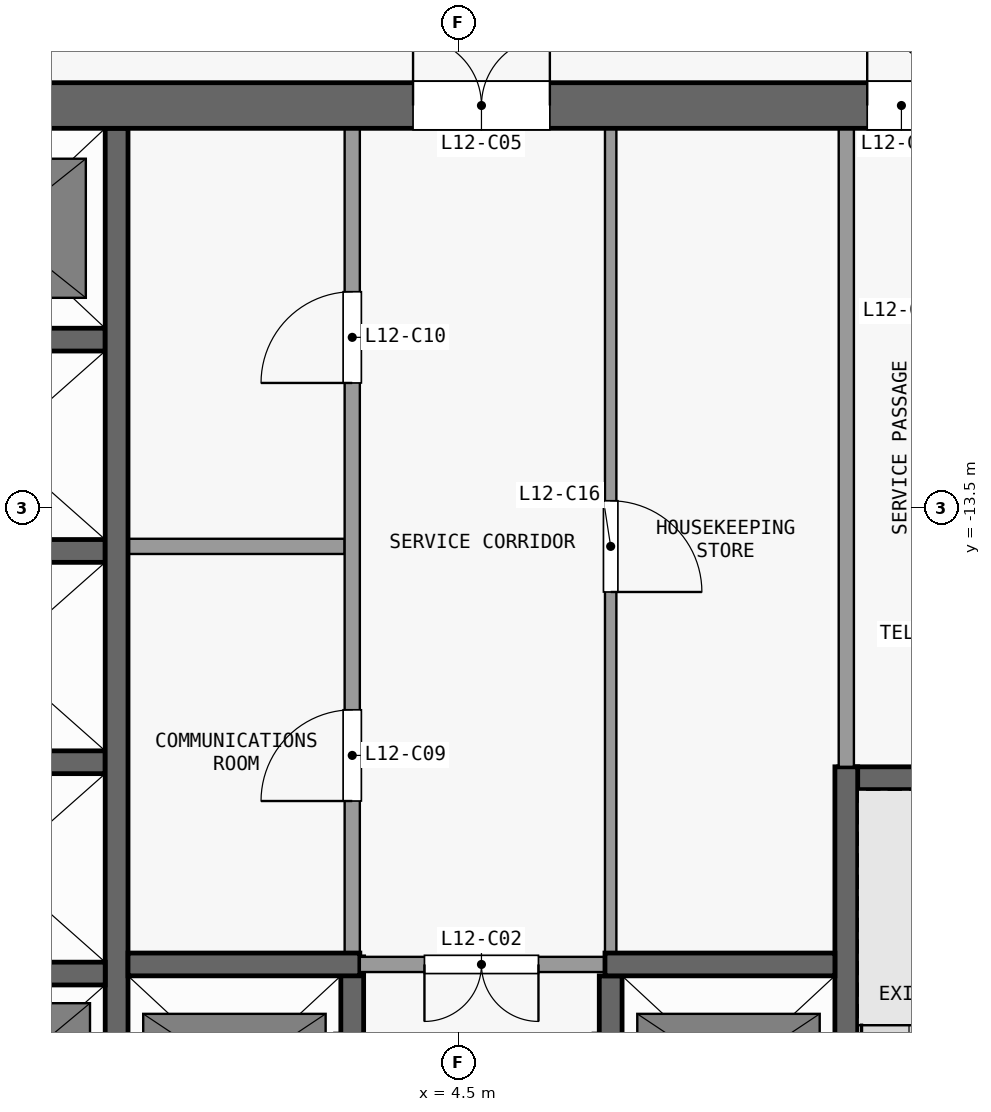
"""IFC4 building model, lengths in metres.
Left out: names, types, materials, properties, quantities, classifications, styles, units other than length and angle.
Written with IfcOpenShell. Run it as: python <this file> out.ifc"""

import sys

from ifc_helpers import new_model, si_unit, direction, frame, frame_2d, origin, place, context, subcontext, project, spatial, rectangle, extrude, element, fill, save


model = new_model("IFC4")
c1 = context("Model", 3, precision=1e-05, world=origin(), true_north=direction((0.0, 1.0)))
c2 = subcontext(c1, "Body", "Model", "MODEL_VIEW")
j1 = project(units=[si_unit("LENGTHUNIT", "METRE"), si_unit("PLANEANGLEUNIT", "RADIAN")], contexts=[c1])
p1 = place(None, origin())
s1 = spatial("IfcSite", under=j1, at=p1, CompositionType="ELEMENT")
p2 = place(p1, origin())
s2 = spatial("IfcBuilding", under=s1, at=p2, CompositionType="ELEMENT")
p3 = place(p2, frame((0.0, 0.0, 54.1)))
s3 = spatial("IfcBuildingStorey", under=s2, at=p3, CompositionType="ELEMENT", Elevation=54.1)
p4 = place(p3, frame((-13.5, -8.2, 0.0), z_axis=(0.0, 0.0, 1.0), x_axis=(1.0, 0.0, 0.0)))
e1 = element("IfcWall", 1, at=p4, inside=s3, PredefinedType="SHEAR", context=c2, shape_type="SweptSolid", body=[
    extrude(rectangle(XDim=27.0, YDim=0.6, at=frame_2d((13.5, 0.0))), origin(), (0.0, 0.0, 1.0), 3.3),
])
p5 = place(p4, frame((7.8, 0.0, 0.0)))
e2 = element("IfcOpeningElement", 2, at=p5, cuts=e1, PredefinedType="OPENING", context=c2, shape_type="SweptSolid", body=[
    extrude(rectangle(XDim=1.8, YDim=2.1, at=frame_2d((0.9, 1.05))), frame((0.0, 0.31, 0.0), z_axis=(0.0, -1.0, 0.0), x_axis=(1.0, 0.0, 0.0)), (0.0, 0.0, 1.0), 0.62),
])
p6 = place(p4, frame((17.4, 0.0, 0.0)))
e3 = element("IfcOpeningElement", 3, at=p6, cuts=e1, PredefinedType="OPENING", context=c2, shape_type="SweptSolid", body=[
    extrude(rectangle(XDim=1.8, YDim=2.1, at=frame_2d((0.9, 1.05))), frame((0.0, 0.31, 0.0), z_axis=(0.0, -1.0, 0.0), x_axis=(1.0, 0.0, 0.0)), (0.0, 0.0, 1.0), 0.62),
])
p7 = place(p4, frame((2.725, 0.0, 0.0)))
e4 = element("IfcOpeningElement", 4, at=p7, cuts=e1, PredefinedType="OPENING", context=c2, shape_type="SweptSolid", body=[
    extrude(rectangle(XDim=0.9, YDim=2.1, at=frame_2d((0.45, 1.05))), frame((0.0, 0.31, 0.0), z_axis=(0.0, -1.0, 0.0), x_axis=(1.0, 0.0, 0.0)), (0.0, 0.0, 1.0), 0.62),
])
p8 = place(p4, frame((23.375, 0.0, 0.0)))
e5 = element("IfcOpeningElement", 5, at=p8, cuts=e1, PredefinedType="OPENING", context=c2, shape_type="SweptSolid", body=[
    extrude(rectangle(XDim=0.9, YDim=2.1, at=frame_2d((0.45, 1.05))), frame((0.0, 0.31, 0.0), z_axis=(0.0, -1.0, 0.0), x_axis=(1.0, 0.0, 0.0)), (0.0, 0.0, 1.0), 0.62),
])
p9 = place(p3, frame((-2.95, -19.62, 0.0), z_axis=(0.0, 0.0, 1.0), x_axis=(1.0, 0.0, 0.0)))
e6 = element("IfcWall", 6, at=p9, inside=s3, PredefinedType="SHEAR", context=c2, shape_type="SweptSolid", body=[
    extrude(rectangle(XDim=2.8, YDim=0.3, at=frame_2d((1.4, 0.0))), origin(), (0.0, 0.0, 1.0), 3.3),
])
p10 = place(p3, frame((0.15, -19.5, 0.0), z_axis=(0.0, 0.0, 1.0), x_axis=(1.0, 0.0, 0.0)))
e7 = element("IfcWall", 7, at=p10, inside=s3, PredefinedType="SHEAR", context=c2, shape_type="SweptSolid", body=[
    extrude(rectangle(XDim=3.05, YDim=0.3, at=frame_2d((1.525, 0.0))), origin(), (0.0, 0.0, 1.0), 3.3),
])
p11 = place(p3, frame((6.575, -19.5, 0.0), z_axis=(0.0, 0.0, 1.0), x_axis=(-1.0, 0.0, 0.0)))
e8 = element("IfcWall", 8, at=p11, inside=s3, PredefinedType="PARTITIONING", context=c2, shape_type="SweptSolid", body=[
    extrude(rectangle(XDim=3.375, YDim=0.2, at=frame_2d((1.688, 0.0))), origin(), (0.0, 0.0, 1.0), 3.3),
])
p12 = place(p11, frame((1.025, 0.0, 0.0)))
e9 = element("IfcOpeningElement", 9, at=p12, cuts=e8, PredefinedType="OPENING", context=c2, shape_type="SweptSolid", body=[
    extrude(rectangle(XDim=1.5, YDim=2.1, at=frame_2d((0.75, 1.05))), frame((0.0, 0.11, 0.0), z_axis=(0.0, -1.0, 0.0), x_axis=(1.0, 0.0, 0.0)), (0.0, 0.0, 1.0), 0.22),
])
p13 = place(p3, frame((6.425, -19.5, 0.0), z_axis=(0.0, 0.0, 1.0), x_axis=(1.0, 0.0, 0.0)))
e10 = element("IfcWall", 10, at=p13, inside=s3, PredefinedType="SHEAR", context=c2, shape_type="SweptSolid", body=[
    extrude(rectangle(XDim=3.025, YDim=0.3, at=frame_2d((1.512, 0.0))), origin(), (0.0, 0.0, 1.0), 3.3),
])
p14 = place(p3, frame((9.5, -17.05, 0.0), z_axis=(0.0, 0.0, 1.0), x_axis=(1.0, 0.0, 0.0)))
e11 = element("IfcWall", 11, at=p14, inside=s3, PredefinedType="SHEAR", context=c2, shape_type="SweptSolid", body=[
    extrude(rectangle(XDim=3.1, YDim=0.3, at=frame_2d((1.55, 0.0))), origin(), (0.0, 0.0, 1.0), 3.3),
])
for number, where, z_axis, x_axis in (
    (12, (-2.95, -16.84, 0.0), (0.0, 0.0, 1.0), (1.0, 0.0, 0.0)),
    (13, (-2.95, -14.06, 0.0), (0.0, 0.0, 1.0), (1.0, 0.0, 0.0)),
):
    element("IfcWall", number, at=place(p3, frame(where, z_axis=z_axis, x_axis=x_axis)), inside=s3, PredefinedType="SHEAR", context=c2, shape_type="SweptSolid", body=[
        extrude(rectangle(XDim=2.8, YDim=0.3, at=frame_2d((1.4, 0.0))), origin(), (0.0, 0.0, 1.0), 3.3),
    ])
p15 = place(p3, frame((0.15, -14.0, 0.0), z_axis=(0.0, 0.0, 1.0), x_axis=(1.0, 0.0, 0.0)))
e14 = element("IfcWall", 14, at=p15, inside=s3, PredefinedType="PARTITIONING", context=c2, shape_type="SweptSolid", body=[
    extrude(rectangle(XDim=2.85, YDim=0.2, at=frame_2d((1.425, 0.0))), origin(), (0.0, 0.0, 1.0), 3.3),
])
p16 = place(p3, frame((-2.95, -11.28, 0.0), z_axis=(0.0, 0.0, 1.0), x_axis=(1.0, 0.0, 0.0)))
e15 = element("IfcWall", 15, at=p16, inside=s3, PredefinedType="SHEAR", context=c2, shape_type="SweptSolid", body=[
    extrude(rectangle(XDim=2.8, YDim=0.3, at=frame_2d((1.4, 0.0))), origin(), (0.0, 0.0, 1.0), 3.3),
])
p17 = place(p3, frame((0.0, -22.25, 0.0), z_axis=(0.0, 0.0, 1.0), x_axis=(0.0, 1.0, 0.0)))
e16 = element("IfcWall", 16, at=p17, inside=s3, PredefinedType="SHEAR", context=c2, shape_type="SweptSolid", body=[
    extrude(rectangle(XDim=13.75, YDim=0.3, at=frame_2d((6.875, 0.0))), origin(), (0.0, 0.0, 1.0), 3.3),
])
p18 = place(p3, frame((3.1, -22.25, 0.0), z_axis=(0.0, 0.0, 1.0), x_axis=(0.0, 1.0, 0.0)))
e17 = element("IfcWall", 17, at=p18, inside=s3, PredefinedType="SHEAR", context=c2, shape_type="SweptSolid", body=[
    extrude(rectangle(XDim=2.85, YDim=0.3, at=frame_2d((1.425, 0.0))), origin(), (0.0, 0.0, 1.0), 3.3),
])
p19 = place(p18, frame((0.75, 0.0, 0.0)))
e18 = element("IfcOpeningElement", 18, at=p19, cuts=e17, PredefinedType="OPENING", context=c2, shape_type="SweptSolid", body=[
    extrude(rectangle(XDim=1.1, YDim=2.1, at=frame_2d((0.55, 1.05))), frame((0.0, 0.16, 0.0), z_axis=(0.0, -1.0, 0.0), x_axis=(1.0, 0.0, 0.0)), (0.0, 0.0, 1.0), 0.32),
])
p20 = place(p3, frame((3.1, -19.6, 0.0), z_axis=(0.0, 0.0, 1.0), x_axis=(0.0, 1.0, 0.0)))
e19 = element("IfcWall", 19, at=p20, inside=s3, PredefinedType="PARTITIONING", context=c2, shape_type="SweptSolid", body=[
    extrude(rectangle(XDim=11.1, YDim=0.2, at=frame_2d((5.55, 0.0))), origin(), (0.0, 0.0, 1.0), 3.3),
])
p21 = place(p20, frame((2.25, 0.0, 0.0)))
e20 = element("IfcOpeningElement", 20, at=p21, cuts=e19, PredefinedType="OPENING", context=c2, shape_type="SweptSolid", body=[
    extrude(rectangle(XDim=1.2, YDim=2.1, at=frame_2d((0.6, 1.05))), frame((0.0, 0.11, 0.0), z_axis=(0.0, -1.0, 0.0), x_axis=(1.0, 0.0, 0.0)), (0.0, 0.0, 1.0), 0.22),
])
p22 = place(p20, frame((7.75, 0.0, 0.0)))
e21 = element("IfcOpeningElement", 21, at=p22, cuts=e19, PredefinedType="OPENING", context=c2, shape_type="SweptSolid", body=[
    extrude(rectangle(XDim=1.2, YDim=2.1, at=frame_2d((0.6, 1.05))), frame((0.0, 0.11, 0.0), z_axis=(0.0, -1.0, 0.0), x_axis=(1.0, 0.0, 0.0)), (0.0, 0.0, 1.0), 0.22),
])
p23 = place(p3, frame((6.5, -22.25, 0.0), z_axis=(0.0, 0.0, 1.0), x_axis=(0.0, 1.0, 0.0)))
e22 = element("IfcWall", 22, at=p23, inside=s3, PredefinedType="SHEAR", context=c2, shape_type="SweptSolid", body=[
    extrude(rectangle(XDim=2.6, YDim=0.3, at=frame_2d((1.3, 0.0))), origin(), (0.0, 0.0, 1.0), 3.3),
])
p24 = place(p23, frame((0.75, 0.0, 0.0)))
e23 = element("IfcOpeningElement", 23, at=p24, cuts=e22, PredefinedType="OPENING", context=c2, shape_type="SweptSolid", body=[
    extrude(rectangle(XDim=1.1, YDim=2.1, at=frame_2d((0.55, 1.05))), frame((0.0, 0.16, 0.0), z_axis=(0.0, -1.0, 0.0), x_axis=(1.0, 0.0, 0.0)), (0.0, 0.0, 1.0), 0.32),
])
p25 = place(p3, frame((6.5, -8.5, 0.0), z_axis=(0.0, 0.0, 1.0), x_axis=(0.0, -1.0, 0.0)))
e24 = element("IfcWall", 24, at=p25, inside=s3, PredefinedType="PARTITIONING", context=c2, shape_type="SweptSolid", body=[
    extrude(rectangle(XDim=10.85, YDim=0.15, at=frame_2d((5.425, 0.0))), origin(), (0.0, 0.0, 1.0), 3.3),
])
p26 = place(p25, frame((4.9, 0.0, 0.0)))
e25 = element("IfcOpeningElement", 25, at=p26, cuts=e24, PredefinedType="OPENING", context=c2, shape_type="SweptSolid", body=[
    extrude(rectangle(XDim=1.2, YDim=2.1, at=frame_2d((0.6, 1.05))), frame((0.0, 0.085, 0.0), z_axis=(0.0, -1.0, 0.0), x_axis=(1.0, 0.0, 0.0)), (0.0, 0.0, 1.0), 0.17),
])
p27 = place(p3, frame((9.6, -16.9, 0.0), z_axis=(0.0, 0.0, 1.0), x_axis=(0.0, -1.0, 0.0)))
e26 = element("IfcWall", 26, at=p27, inside=s3, PredefinedType="SHEAR", context=c2, shape_type="SweptSolid", body=[
    extrude(rectangle(XDim=7.7, YDim=0.3, at=frame_2d((3.85, 0.0))), origin(), (0.0, 0.0, 1.0), 3.3),
])
p28 = place(p27, frame((6.5, 0.0, 0.0)))
e27 = element("IfcOpeningElement", 27, at=p28, cuts=e26, PredefinedType="OPENING", context=c2, shape_type="SweptSolid", body=[
    extrude(rectangle(XDim=1.1, YDim=2.1, at=frame_2d((0.55, 1.05))), frame((0.0, 0.16, 0.0), z_axis=(0.0, -1.0, 0.0), x_axis=(1.0, 0.0, 0.0)), (0.0, 0.0, 1.0), 0.32),
])
p29 = place(p3, frame((9.6, -16.9, 0.0), z_axis=(0.0, 0.0, 1.0), x_axis=(0.0, 1.0, 0.0)))
e28 = element("IfcWall", 28, at=p29, inside=s3, PredefinedType="PARTITIONING", context=c2, shape_type="SweptSolid", body=[
    extrude(rectangle(XDim=8.4, YDim=0.2, at=frame_2d((4.2, 0.0))), origin(), (0.0, 0.0, 1.0), 3.3),
])
p30 = place(p12, origin())
e29 = element("IfcDoor", 29, at=p30, inside=s3, OperationType="DOUBLE_DOOR_SINGLE_SWING", PredefinedType="DOOR", context=c2, shape_type="SweptSolid", body=[
    extrude(rectangle(XDim=1.5, YDim=2.1, at=frame_2d((0.75, 1.05))), frame((0.0, 0.025, 0.0), z_axis=(0.0, -1.0, 0.0), x_axis=(1.0, 0.0, 0.0)), (0.0, 0.0, 1.0), 0.05),
])
fill(e9, e29)
p31 = place(p6, origin())
e30 = element("IfcDoor", 30, at=p31, inside=s3, OperationType="DOUBLE_DOOR_SINGLE_SWING", PredefinedType="DOOR", context=c2, shape_type="SweptSolid", body=[
    extrude(rectangle(XDim=1.8, YDim=2.1, at=frame_2d((0.9, 1.05))), frame((0.0, 0.025, 0.0), z_axis=(0.0, -1.0, 0.0), x_axis=(1.0, 0.0, 0.0)), (0.0, 0.0, 1.0), 0.05),
])
fill(e3, e30)
p32 = place(p21, origin())
e31 = element("IfcDoor", 31, at=p32, inside=s3, OperationType="SINGLE_SWING_LEFT", PredefinedType="DOOR", context=c2, shape_type="SweptSolid", body=[
    extrude(rectangle(XDim=1.2, YDim=2.1, at=frame_2d((0.6, 1.05))), frame((0.0, 0.025, 0.0), z_axis=(0.0, -1.0, 0.0), x_axis=(1.0, 0.0, 0.0)), (0.0, 0.0, 1.0), 0.05),
])
fill(e20, e31)
p33 = place(p22, origin())
e32 = element("IfcDoor", 32, at=p33, inside=s3, OperationType="SINGLE_SWING_LEFT", PredefinedType="DOOR", context=c2, shape_type="SweptSolid", body=[
    extrude(rectangle(XDim=1.2, YDim=2.1, at=frame_2d((0.6, 1.05))), frame((0.0, 0.025, 0.0), z_axis=(0.0, -1.0, 0.0), x_axis=(1.0, 0.0, 0.0)), (0.0, 0.0, 1.0), 0.05),
])
fill(e21, e32)
p34 = place(p8, origin())
e33 = element("IfcDoor", 33, at=p34, inside=s3, OperationType="SINGLE_SWING_LEFT", PredefinedType="DOOR", context=c2, shape_type="SweptSolid", body=[
    extrude(rectangle(XDim=0.9, YDim=2.1, at=frame_2d((0.45, 1.05))), frame((0.0, 0.025, 0.0), z_axis=(0.0, -1.0, 0.0), x_axis=(1.0, 0.0, 0.0)), (0.0, 0.0, 1.0), 0.05),
])
fill(e5, e33)
p35 = place(p26, origin())
e34 = element("IfcDoor", 34, at=p35, inside=s3, OperationType="SINGLE_SWING_RIGHT", PredefinedType="DOOR", context=c2, shape_type="SweptSolid", body=[
    extrude(rectangle(XDim=1.2, YDim=2.1, at=frame_2d((0.6, 1.05))), frame((0.0, 0.025, 0.0), z_axis=(0.0, -1.0, 0.0), x_axis=(1.0, 0.0, 0.0)), (0.0, 0.0, 1.0), 0.05),
])
fill(e25, e34)
save(model, sys.argv[1])
